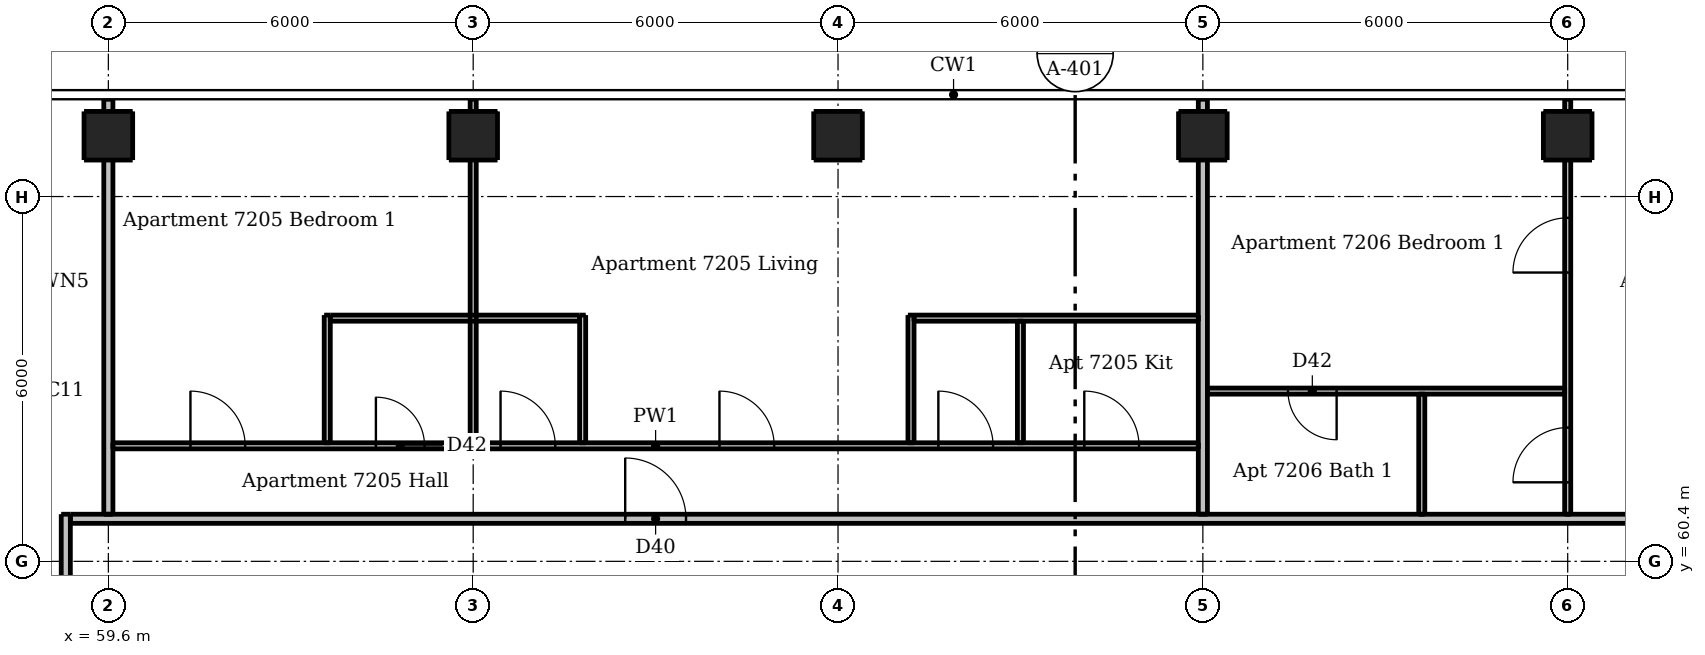
"""IFC4 building model, lengths in metres.
Left out: names, types, materials, properties, quantities, classifications, styles, units other than length and angle.
Written with IfcOpenShell. Run it as: python <this file> out.ifc"""

import sys

from ifc_helpers import new_model, si_unit, direction, frame, frame_2d, origin, origin_2d, place, context, subcontext, project, spatial, rectangle, extrude, element, fill, save


model = new_model("IFC4")
c1 = context("Model", 3, precision=1e-05, world=origin(), true_north=direction((0.0, 1.0)))
c2 = subcontext(c1, "Body", "Model", "MODEL_VIEW")
j1 = project(units=[si_unit("LENGTHUNIT", "METRE"), si_unit("PLANEANGLEUNIT", "RADIAN")], contexts=[c1])
p1 = place(None, origin())
s1 = spatial("IfcSite", under=j1, at=p1, CompositionType="ELEMENT")
p2 = place(p1, origin())
s2 = spatial("IfcBuilding", under=s1, at=p2, CompositionType="ELEMENT")
p3 = place(p2, frame((0.0, 0.0, 268.6)))
s3 = spatial("IfcBuildingStorey", under=s2, at=p3, CompositionType="ELEMENT", Elevation=268.6)
for number, where, z_axis, x_axis in (
    (1, (59.6, 67.4, 0.0), (0.0, 0.0, 1.0), (1.0, 0.0, 0.0)),
    (2, (65.6, 67.4, 0.0), (0.0, 0.0, 1.0), (1.0, 0.0, 0.0)),
    (3, (71.6, 67.4, 0.0), (0.0, 0.0, 1.0), (1.0, 0.0, 0.0)),
    (4, (77.6, 67.4, 0.0), (0.0, 0.0, 1.0), (1.0, 0.0, 0.0)),
    (5, (83.6, 67.4, 0.0), (0.0, 0.0, 1.0), (1.0, 0.0, 0.0)),
):
    element("IfcColumn", number, at=place(p3, frame(where, z_axis=z_axis, x_axis=x_axis)), inside=s3, PredefinedType="COLUMN", context=c2, shape_type="SweptSolid", body=[
        extrude(rectangle(XDim=0.8, YDim=0.8, at=origin_2d()), origin(), (0.0, 0.0, 1.0), 3.05),
    ])
p4 = place(p3, frame((63.2, 62.35, 0.0), z_axis=(0.0, 0.0, 1.0), x_axis=(0.0, 1.0, 0.0)))
e6 = element("IfcWall", 6, at=p4, inside=s3, PredefinedType="PARTITIONING", context=c2, shape_type="SweptSolid", body=[
    extrude(rectangle(XDim=2.1, YDim=0.1, at=frame_2d((1.05, 0.0))), origin(), (0.0, 0.0, 1.0), 3.05),
])
p5 = place(p3, frame((65.6, 62.35, 0.0), z_axis=(0.0, 0.0, 1.0), x_axis=(0.0, 1.0, 0.0)))
e7 = element("IfcWall", 7, at=p5, inside=s3, PredefinedType="PARTITIONING", context=c2, shape_type="SweptSolid", body=[
    extrude(rectangle(XDim=5.65, YDim=0.1, at=frame_2d((2.825, 0.0))), origin(), (0.0, 0.0, 1.0), 2.516),
])
for number, where, z_axis, x_axis in (
    (8, (67.4, 62.35, 0.0), (0.0, 0.0, 1.0), (0.0, 1.0, 0.0)),
    (9, (72.8, 62.35, 0.0), (0.0, 0.0, 1.0), (0.0, 1.0, 0.0)),
):
    element("IfcWall", number, at=place(p3, frame(where, z_axis=z_axis, x_axis=x_axis)), inside=s3, PredefinedType="PARTITIONING", context=c2, shape_type="SweptSolid", body=[
        extrude(rectangle(XDim=2.1, YDim=0.1, at=frame_2d((1.05, 0.0))), origin(), (0.0, 0.0, 1.0), 3.05),
    ])
p6 = place(p3, frame((74.6, 62.35, 0.0), z_axis=(0.0, 0.0, 1.0), x_axis=(0.0, 1.0, 0.0)))
e10 = element("IfcWall", 10, at=p6, inside=s3, PredefinedType="PARTITIONING", context=c2, shape_type="SweptSolid", body=[
    extrude(rectangle(XDim=2.0, YDim=0.1, at=frame_2d((1.0, 0.0))), origin(), (0.0, 0.0, 1.0), 3.05),
])
p7 = place(p3, frame((81.2, 61.175, 0.0), z_axis=(0.0, 0.0, 1.0), x_axis=(0.0, 1.0, 0.0)))
e11 = element("IfcWall", 11, at=p7, inside=s3, PredefinedType="PARTITIONING", context=c2, shape_type="SweptSolid", body=[
    extrude(rectangle(XDim=1.975, YDim=0.1, at=frame_2d((0.987, 0.0))), origin(), (0.0, 0.0, 1.0), 3.05),
])
p8 = place(p3, frame((83.6, 61.175, 0.0), z_axis=(0.0, 0.0, 1.0), x_axis=(0.0, 1.0, 0.0)))
e12 = element("IfcWall", 12, at=p8, inside=s3, PredefinedType="PARTITIONING", context=c2, shape_type="SweptSolid", body=[
    extrude(rectangle(XDim=6.825, YDim=0.1, at=frame_2d((3.413, 0.0))), origin(), (0.0, 0.0, 1.0), 2.516),
])
p9 = place(p8, frame((0.525, 0.0, 0.0)))
e13 = element("IfcOpeningElement", 13, at=p9, cuts=e12, PredefinedType="OPENING", context=c2, shape_type="SweptSolid", body=[
    extrude(rectangle(XDim=0.9, YDim=2.1, at=frame_2d((0.45, 1.05))), frame((0.0, 0.06, 0.0), z_axis=(0.0, -1.0, 0.0), x_axis=(1.0, 0.0, 0.0)), (0.0, 0.0, 1.0), 0.12),
])
p10 = place(p8, frame((3.975, 0.0, 0.0)))
e14 = element("IfcOpeningElement", 14, at=p10, cuts=e12, PredefinedType="OPENING", context=c2, shape_type="SweptSolid", body=[
    extrude(rectangle(XDim=0.9, YDim=2.1, at=frame_2d((0.45, 1.05))), frame((0.0, 0.06, 0.0), z_axis=(0.0, -1.0, 0.0), x_axis=(1.0, 0.0, 0.0)), (0.0, 0.0, 1.0), 0.12),
])
p11 = place(p3, frame((63.25, 64.4, 0.0), z_axis=(0.0, 0.0, 1.0), x_axis=(1.0, 0.0, 0.0)))
e15 = element("IfcWall", 15, at=p11, inside=s3, PredefinedType="PARTITIONING", context=c2, shape_type="SweptSolid", body=[
    extrude(rectangle(XDim=4.1, YDim=0.1, at=frame_2d((2.05, 0.0))), origin(), (0.0, 0.0, 1.0), 3.05),
])
p12 = place(p3, frame((72.85, 64.4, 0.0), z_axis=(0.0, 0.0, 1.0), x_axis=(1.0, 0.0, 0.0)))
e16 = element("IfcWall", 16, at=p12, inside=s3, PredefinedType="PARTITIONING", context=c2, shape_type="SweptSolid", body=[
    extrude(rectangle(XDim=4.675, YDim=0.1, at=frame_2d((2.337, 0.0))), origin(), (0.0, 0.0, 1.0), 3.05),
])
p13 = place(p3, frame((83.55, 63.2, 0.0), z_axis=(0.0, 0.0, 1.0), x_axis=(-1.0, 0.0, 0.0)))
e17 = element("IfcWall", 17, at=p13, inside=s3, PredefinedType="PARTITIONING", context=c2, shape_type="SweptSolid", body=[
    extrude(rectangle(XDim=5.875, YDim=0.1, at=frame_2d((2.938, 0.0))), origin(), (0.0, 0.0, 1.0), 3.05),
])
p14 = place(p13, frame((3.75, 0.0, 0.0)))
e18 = element("IfcOpeningElement", 18, at=p14, cuts=e17, PredefinedType="OPENING", context=c2, shape_type="SweptSolid", body=[
    extrude(rectangle(XDim=0.8, YDim=2.1, at=frame_2d((0.4, 1.05))), frame((0.0, 0.06, 0.0), z_axis=(0.0, -1.0, 0.0), x_axis=(1.0, 0.0, 0.0)), (0.0, 0.0, 1.0), 0.12),
])
p15 = place(p3, frame((59.675, 62.3, 0.0), z_axis=(0.0, 0.0, 1.0), x_axis=(1.0, 0.0, 0.0)))
e19 = element("IfcWall", 19, at=p15, inside=s3, PredefinedType="PARTITIONING", context=c2, shape_type="SweptSolid", body=[
    extrude(rectangle(XDim=17.85, YDim=0.1, at=frame_2d((8.925, 0.0))), origin(), (0.0, 0.0, 1.0), 3.05),
])
p16 = place(p15, frame((9.975, 0.0, 0.0)))
e20 = element("IfcOpeningElement", 20, at=p16, cuts=e19, PredefinedType="OPENING", context=c2, shape_type="SweptSolid", body=[
    extrude(rectangle(XDim=0.9, YDim=2.1, at=frame_2d((0.45, 1.05))), frame((0.0, 0.06, 0.0), z_axis=(0.0, -1.0, 0.0), x_axis=(1.0, 0.0, 0.0)), (0.0, 0.0, 1.0), 0.12),
])
p17 = place(p15, frame((15.975, 0.0, 0.0)))
e21 = element("IfcOpeningElement", 21, at=p17, cuts=e19, PredefinedType="OPENING", context=c2, shape_type="SweptSolid", body=[
    extrude(rectangle(XDim=0.9, YDim=2.1, at=frame_2d((0.45, 1.05))), frame((0.0, 0.06, 0.0), z_axis=(0.0, -1.0, 0.0), x_axis=(1.0, 0.0, 0.0)), (0.0, 0.0, 1.0), 0.12),
])
p18 = place(p15, frame((13.575, 0.0, 0.0)))
e22 = element("IfcOpeningElement", 22, at=p18, cuts=e19, PredefinedType="OPENING", context=c2, shape_type="SweptSolid", body=[
    extrude(rectangle(XDim=0.9, YDim=2.1, at=frame_2d((0.45, 1.05))), frame((0.0, 0.06, 0.0), z_axis=(0.0, -1.0, 0.0), x_axis=(1.0, 0.0, 0.0)), (0.0, 0.0, 1.0), 0.12),
])
p19 = place(p15, frame((6.375, 0.0, 0.0)))
e23 = element("IfcOpeningElement", 23, at=p19, cuts=e19, PredefinedType="OPENING", context=c2, shape_type="SweptSolid", body=[
    extrude(rectangle(XDim=0.9, YDim=2.1, at=frame_2d((0.45, 1.05))), frame((0.0, 0.06, 0.0), z_axis=(0.0, -1.0, 0.0), x_axis=(1.0, 0.0, 0.0)), (0.0, 0.0, 1.0), 0.12),
])
p20 = place(p15, frame((1.275, 0.0, 0.0)))
e24 = element("IfcOpeningElement", 24, at=p20, cuts=e19, PredefinedType="OPENING", context=c2, shape_type="SweptSolid", body=[
    extrude(rectangle(XDim=0.9, YDim=2.1, at=frame_2d((0.45, 1.05))), frame((0.0, 0.06, 0.0), z_axis=(0.0, -1.0, 0.0), x_axis=(1.0, 0.0, 0.0)), (0.0, 0.0, 1.0), 0.12),
])
p21 = place(p15, frame((4.325, 0.0, 0.0)))
e25 = element("IfcOpeningElement", 25, at=p21, cuts=e19, PredefinedType="OPENING", context=c2, shape_type="SweptSolid", body=[
    extrude(rectangle(XDim=0.8, YDim=2.1, at=frame_2d((0.4, 1.05))), frame((0.0, 0.06, 0.0), z_axis=(0.0, -1.0, 0.0), x_axis=(1.0, 0.0, 0.0)), (0.0, 0.0, 1.0), 0.12),
])
p22 = place(p3, frame((58.9, 30.325, 0.0), z_axis=(0.0, 0.0, 1.0), x_axis=(0.0, 1.0, 0.0)))
e26 = element("IfcWall", 26, at=p22, inside=s3, PredefinedType="PARTITIONING", context=c2, shape_type="SweptSolid", body=[
    extrude(rectangle(XDim=30.85, YDim=0.15, at=frame_2d((15.425, 0.0))), origin(), (0.0, 0.0, 1.0), 3.05),
])
p23 = place(p22, frame((9.225, 0.0, 0.0)))
e27 = element("IfcOpeningElement", 27, at=p23, cuts=e26, PredefinedType="OPENING", context=c2, shape_type="SweptSolid", body=[
    extrude(rectangle(XDim=1.0, YDim=2.1, at=frame_2d((0.5, 1.05))), frame((0.0, 0.085, 0.0), z_axis=(0.0, -1.0, 0.0), x_axis=(1.0, 0.0, 0.0)), (0.0, 0.0, 1.0), 0.17),
])
p24 = place(p22, frame((26.925, 0.0, 0.0)))
e28 = element("IfcOpeningElement", 28, at=p24, cuts=e26, PredefinedType="OPENING", context=c2, shape_type="SweptSolid", body=[
    extrude(rectangle(XDim=1.0, YDim=2.1, at=frame_2d((0.5, 1.05))), frame((0.0, 0.085, 0.0), z_axis=(0.0, -1.0, 0.0), x_axis=(1.0, 0.0, 0.0)), (0.0, 0.0, 1.0), 0.17),
])
p25 = place(p3, frame((59.6, 61.175, 0.0), z_axis=(0.0, 0.0, 1.0), x_axis=(0.0, 1.0, 0.0)))
e29 = element("IfcWall", 29, at=p25, inside=s3, PredefinedType="PARTITIONING", context=c2, shape_type="SweptSolid", body=[
    extrude(rectangle(XDim=6.825, YDim=0.15, at=frame_2d((3.413, 0.0))), origin(), (0.0, 0.0, 1.0), 2.51),
])
p26 = place(p3, frame((77.6, 61.175, 0.0), z_axis=(0.0, 0.0, 1.0), x_axis=(0.0, 1.0, 0.0)))
e30 = element("IfcWall", 30, at=p26, inside=s3, PredefinedType="PARTITIONING", context=c2, shape_type="SweptSolid", body=[
    extrude(rectangle(XDim=6.825, YDim=0.15, at=frame_2d((3.413, 0.0))), origin(), (0.0, 0.0, 1.0), 2.516),
])
p27 = place(p3, frame((58.975, 61.1, 0.0), z_axis=(0.0, 0.0, 1.0), x_axis=(1.0, 0.0, 0.0)))
e31 = element("IfcWall", 31, at=p27, inside=s3, PredefinedType="PARTITIONING", context=c2, shape_type="SweptSolid", body=[
    extrude(rectangle(XDim=29.25, YDim=0.15, at=frame_2d((14.625, 0.0))), origin(), (0.0, 0.0, 1.0), 3.05),
])
p28 = place(p27, frame((9.125, 0.0, 0.0)))
e32 = element("IfcOpeningElement", 32, at=p28, cuts=e31, PredefinedType="OPENING", context=c2, shape_type="SweptSolid", body=[
    extrude(rectangle(XDim=1.0, YDim=2.1, at=frame_2d((0.5, 1.05))), frame((0.0, 0.085, 0.0), z_axis=(0.0, -1.0, 0.0), x_axis=(1.0, 0.0, 0.0)), (0.0, 0.0, 1.0), 0.17),
])
p29 = place(p27, frame((26.475, 0.0, 0.0)))
e33 = element("IfcOpeningElement", 33, at=p29, cuts=e31, PredefinedType="OPENING", context=c2, shape_type="SweptSolid", body=[
    extrude(rectangle(XDim=1.0, YDim=2.1, at=frame_2d((0.5, 1.05))), frame((0.0, 0.085, 0.0), z_axis=(0.0, -1.0, 0.0), x_axis=(1.0, 0.0, 0.0)), (0.0, 0.0, 1.0), 0.17),
])
p30 = place(p28, origin())
e34 = element("IfcDoor", 34, at=p30, inside=s3, OperationType="SINGLE_SWING_LEFT", PredefinedType="DOOR", context=c2, shape_type="SweptSolid", body=[
    extrude(rectangle(XDim=1.0, YDim=2.1, at=frame_2d((0.5, 1.05))), frame((0.0, 0.025, 0.0), z_axis=(0.0, -1.0, 0.0), x_axis=(1.0, 0.0, 0.0)), (0.0, 0.0, 1.0), 0.05),
])
fill(e32, e34)
p31 = place(p16, origin())
e35 = element("IfcDoor", 35, at=p31, inside=s3, OperationType="SINGLE_SWING_LEFT", PredefinedType="DOOR", context=c2, shape_type="SweptSolid", body=[
    extrude(rectangle(XDim=0.9, YDim=2.1, at=frame_2d((0.45, 1.05))), frame((0.0, 0.025, 0.0), z_axis=(0.0, -1.0, 0.0), x_axis=(1.0, 0.0, 0.0)), (0.0, 0.0, 1.0), 0.05),
])
fill(e20, e35)
p32 = place(p17, origin())
e36 = element("IfcDoor", 36, at=p32, inside=s3, OperationType="SINGLE_SWING_LEFT", PredefinedType="DOOR", context=c2, shape_type="SweptSolid", body=[
    extrude(rectangle(XDim=0.9, YDim=2.1, at=frame_2d((0.45, 1.05))), frame((0.0, 0.025, 0.0), z_axis=(0.0, -1.0, 0.0), x_axis=(1.0, 0.0, 0.0)), (0.0, 0.0, 1.0), 0.05),
])
fill(e21, e36)
p33 = place(p18, origin())
e37 = element("IfcDoor", 37, at=p33, inside=s3, OperationType="SINGLE_SWING_LEFT", PredefinedType="DOOR", context=c2, shape_type="SweptSolid", body=[
    extrude(rectangle(XDim=0.9, YDim=2.1, at=frame_2d((0.45, 1.05))), frame((0.0, 0.025, 0.0), z_axis=(0.0, -1.0, 0.0), x_axis=(1.0, 0.0, 0.0)), (0.0, 0.0, 1.0), 0.05),
])
fill(e22, e37)
p34 = place(p19, origin())
e38 = element("IfcDoor", 38, at=p34, inside=s3, OperationType="SINGLE_SWING_LEFT", PredefinedType="DOOR", context=c2, shape_type="SweptSolid", body=[
    extrude(rectangle(XDim=0.9, YDim=2.1, at=frame_2d((0.45, 1.05))), frame((0.0, 0.025, 0.0), z_axis=(0.0, -1.0, 0.0), x_axis=(1.0, 0.0, 0.0)), (0.0, 0.0, 1.0), 0.05),
])
fill(e23, e38)
p35 = place(p20, origin())
e39 = element("IfcDoor", 39, at=p35, inside=s3, OperationType="SINGLE_SWING_LEFT", PredefinedType="DOOR", context=c2, shape_type="SweptSolid", body=[
    extrude(rectangle(XDim=0.9, YDim=2.1, at=frame_2d((0.45, 1.05))), frame((0.0, 0.025, 0.0), z_axis=(0.0, -1.0, 0.0), x_axis=(1.0, 0.0, 0.0)), (0.0, 0.0, 1.0), 0.05),
])
fill(e24, e39)
p36 = place(p21, origin())
e40 = element("IfcDoor", 40, at=p36, inside=s3, OperationType="SINGLE_SWING_LEFT", PredefinedType="DOOR", context=c2, shape_type="SweptSolid", body=[
    extrude(rectangle(XDim=0.8, YDim=2.1, at=frame_2d((0.4, 1.05))), frame((0.0, 0.025, 0.0), z_axis=(0.0, -1.0, 0.0), x_axis=(1.0, 0.0, 0.0)), (0.0, 0.0, 1.0), 0.05),
])
fill(e25, e40)
p37 = place(p9, origin())
e41 = element("IfcDoor", 41, at=p37, inside=s3, OperationType="SINGLE_SWING_LEFT", PredefinedType="DOOR", context=c2, shape_type="SweptSolid", body=[
    extrude(rectangle(XDim=0.9, YDim=2.1, at=frame_2d((0.45, 1.05))), frame((0.0, 0.025, 0.0), z_axis=(0.0, -1.0, 0.0), x_axis=(1.0, 0.0, 0.0)), (0.0, 0.0, 1.0), 0.05),
])
fill(e13, e41)
p38 = place(p10, origin())
e42 = element("IfcDoor", 42, at=p38, inside=s3, OperationType="SINGLE_SWING_LEFT", PredefinedType="DOOR", context=c2, shape_type="SweptSolid", body=[
    extrude(rectangle(XDim=0.9, YDim=2.1, at=frame_2d((0.45, 1.05))), frame((0.0, 0.025, 0.0), z_axis=(0.0, -1.0, 0.0), x_axis=(1.0, 0.0, 0.0)), (0.0, 0.0, 1.0), 0.05),
])
fill(e14, e42)
p39 = place(p14, origin())
e43 = element("IfcDoor", 43, at=p39, inside=s3, OperationType="SINGLE_SWING_LEFT", PredefinedType="DOOR", context=c2, shape_type="SweptSolid", body=[
    extrude(rectangle(XDim=0.8, YDim=2.1, at=frame_2d((0.4, 1.05))), frame((0.0, 0.025, 0.0), z_axis=(0.0, -1.0, 0.0), x_axis=(1.0, 0.0, 0.0)), (0.0, 0.0, 1.0), 0.05),
])
fill(e18, e43)
save(model, sys.argv[1])
